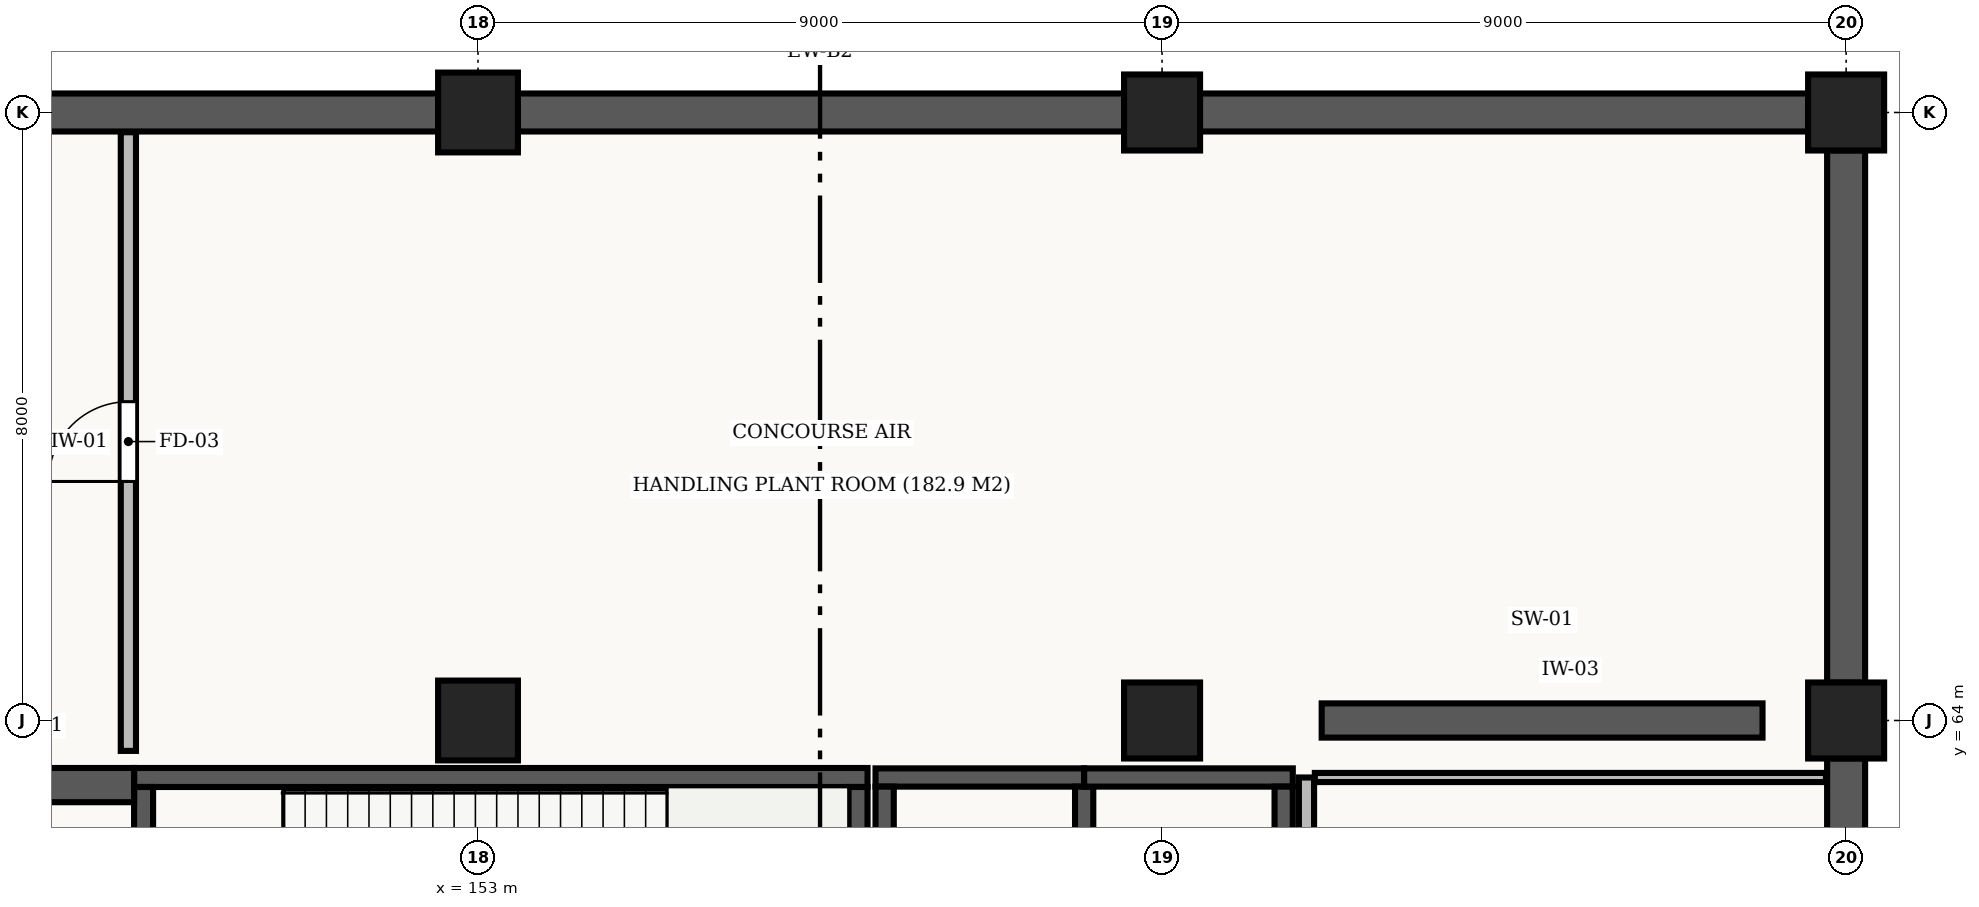
"""IFC4 building model, lengths in metres.
Left out: names, types, materials, properties, quantities, classifications, styles, units other than length and angle.
Written with IfcOpenShell. Run it as: python <this file> out.ifc"""

import sys

from ifc_helpers import new_model, si_unit, direction, frame, frame_2d, origin, origin_2d, place, context, subcontext, project, spatial, rectangle, extrude, element, fill, save


model = new_model("IFC4")
c1 = context("Model", 3, precision=1e-05, world=origin(), true_north=direction((0.0, 1.0)))
c2 = subcontext(c1, "Body", "Model", "MODEL_VIEW")
j1 = project(units=[si_unit("LENGTHUNIT", "METRE"), si_unit("PLANEANGLEUNIT", "RADIAN")], contexts=[c1])
p1 = place(None, origin())
s1 = spatial("IfcSite", under=j1, at=p1, CompositionType="ELEMENT")
p2 = place(p1, origin())
s2 = spatial("IfcBuilding", under=s1, at=p2, CompositionType="ELEMENT")
p3 = place(p2, frame((0.0, 0.0, -6.0)))
s3 = spatial("IfcBuildingStorey", under=s2, at=p3, CompositionType="ELEMENT", Elevation=-6.0)
for number, where, z_axis, x_axis in (
    (1, (153.0, 64.0, 0.0), (0.0, 0.0, 1.0), (1.0, 0.0, 0.0)),
    (2, (153.0, 72.0, 0.0), (0.0, 0.0, 1.0), (1.0, 0.0, 0.0)),
):
    element("IfcColumn", number, at=place(p3, frame(where, z_axis=z_axis, x_axis=x_axis)), inside=s3, PredefinedType="COLUMN", context=c2, shape_type="SweptSolid", body=[
        extrude(rectangle(XDim=1.05, YDim=1.05, at=origin_2d()), origin(), (0.0, 0.0, 1.0), 6.0),
    ])
for number, where, z_axis, x_axis in (
    (3, (162.0, 64.0, 0.0), (0.0, 0.0, 1.0), (1.0, 0.0, 0.0)),
    (4, (162.0, 72.0, 0.0), (0.0, 0.0, 1.0), (1.0, 0.0, 0.0)),
    (5, (171.0, 64.0, 0.0), (0.0, 0.0, 1.0), (1.0, 0.0, 0.0)),
    (6, (171.0, 72.0, 0.0), (0.0, 0.0, 1.0), (1.0, 0.0, 0.0)),
):
    element("IfcColumn", number, at=place(p3, frame(where, z_axis=z_axis, x_axis=x_axis)), inside=s3, PredefinedType="COLUMN", context=c2, shape_type="SweptSolid", body=[
        extrude(rectangle(XDim=1.0, YDim=1.0, at=origin_2d()), origin(), (0.0, 0.0, 1.0), 6.0),
    ])
for number, where, z_axis, x_axis in (
    (7, (144.498, 72.0, 0.0), (0.0, 0.0, 1.0), (1.0, 0.0, 0.0)),
    (8, (153.523, 72.0, 0.0), (0.0, 0.0, 1.0), (1.0, 0.0, 0.0)),
):
    element("IfcWall", number, at=place(p3, frame(where, z_axis=z_axis, x_axis=x_axis)), inside=s3, PredefinedType="STANDARD", context=c2, shape_type="SweptSolid", body=[
        extrude(rectangle(XDim=7.979, YDim=0.5, at=frame_2d((3.99, 0.0))), origin(), (0.0, 0.0, 1.0), 5.56),
    ])
p4 = place(p3, frame((162.498, 72.0, 0.0), z_axis=(0.0, 0.0, 1.0), x_axis=(1.0, 0.0, 0.0)))
e9 = element("IfcWall", 9, at=p4, inside=s3, PredefinedType="STANDARD", context=c2, shape_type="SweptSolid", body=[
    extrude(rectangle(XDim=8.004, YDim=0.5, at=frame_2d((4.002, 0.0))), origin(), (0.0, 0.0, 1.0), 5.56),
])
for number, where, z_axis, x_axis in (
    (10, (171.0, 71.502, 0.0), (0.0, 0.0, 1.0), (0.0, -1.0, 0.0)),
    (11, (171.0, 63.502, 0.0), (0.0, 0.0, 1.0), (0.0, -1.0, 0.0)),
):
    element("IfcWall", number, at=place(p3, frame(where, z_axis=z_axis, x_axis=x_axis)), inside=s3, PredefinedType="STANDARD", context=c2, shape_type="SweptSolid", body=[
        extrude(rectangle(XDim=7.004, YDim=0.5, at=frame_2d((3.502, 0.0))), origin(), (0.0, 0.0, 1.0), 5.56),
    ])
p5 = place(p3, frame((158.125, 63.25, 0.0), z_axis=(0.0, 0.0, 1.0), x_axis=(-1.0, 0.0, 0.0)))
e12 = element("IfcWall", 12, at=p5, inside=s3, PredefinedType="SHEAR", context=c2, shape_type="SweptSolid", body=[
    extrude(rectangle(XDim=9.65, YDim=0.25, at=frame_2d((4.825, 0.0))), origin(), (0.0, 0.0, 1.0), 5.55),
])
for number, where, z_axis, x_axis in (
    (13, (148.6, 63.125, 0.0), (0.0, 0.0, 1.0), (0.0, -1.0, 0.0)),
    (14, (158.0, 59.275, 0.0), (0.0, 0.0, 1.0), (0.0, 1.0, 0.0)),
):
    element("IfcWall", number, at=place(p3, frame(where, z_axis=z_axis, x_axis=x_axis)), inside=s3, PredefinedType="SHEAR", context=c2, shape_type="SweptSolid", body=[
        extrude(rectangle(XDim=3.85, YDim=0.25, at=frame_2d((1.925, 0.0))), origin(), (0.0, 0.0, 1.0), 5.55),
    ])
p6 = place(p3, frame((160.975, 63.25, 0.0), z_axis=(0.0, 0.0, 1.0), x_axis=(-1.0, 0.0, 0.0)))
e15 = element("IfcWall", 15, at=p6, inside=s3, PredefinedType="SHEAR", context=c2, shape_type="SweptSolid", body=[
    extrude(rectangle(XDim=2.745, YDim=0.24, at=frame_2d((1.373, 0.0))), origin(), (0.0, 0.0, 1.0), 5.55),
])
for number, where, z_axis, x_axis in (
    (16, (158.35, 63.13, 0.0), (0.0, 0.0, 1.0), (0.0, -1.0, 0.0)),
    (17, (160.975, 59.27, 0.0), (0.0, 0.0, 1.0), (0.0, 1.0, 0.0)),
):
    element("IfcWall", number, at=place(p3, frame(where, z_axis=z_axis, x_axis=x_axis)), inside=s3, PredefinedType="SHEAR", context=c2, shape_type="SweptSolid", body=[
        extrude(rectangle(XDim=3.86, YDim=0.24, at=frame_2d((1.93, 0.0))), origin(), (0.0, 0.0, 1.0), 5.55),
    ])
p7 = place(p3, frame((163.72, 63.25, 0.0), z_axis=(0.0, 0.0, 1.0), x_axis=(-1.0, 0.0, 0.0)))
e18 = element("IfcWall", 18, at=p7, inside=s3, PredefinedType="SHEAR", context=c2, shape_type="SweptSolid", body=[
    extrude(rectangle(XDim=2.745, YDim=0.24, at=frame_2d((1.373, 0.0))), origin(), (0.0, 0.0, 1.0), 5.55),
])
p8 = place(p3, frame((163.6, 59.27, 0.0), z_axis=(0.0, 0.0, 1.0), x_axis=(0.0, 1.0, 0.0)))
e19 = element("IfcWall", 19, at=p8, inside=s3, PredefinedType="SHEAR", context=c2, shape_type="SweptSolid", body=[
    extrude(rectangle(XDim=3.86, YDim=0.24, at=frame_2d((1.93, 0.0))), origin(), (0.0, 0.0, 1.0), 5.55),
])
p9 = place(p3, frame((145.775, 63.15, 0.0), z_axis=(0.0, 0.0, 1.0), x_axis=(1.0, 0.0, 0.0)))
e20 = element("IfcWall", 20, at=p9, inside=s3, PredefinedType="SHEAR", context=c2, shape_type="SweptSolid", body=[
    extrude(rectangle(XDim=2.7, YDim=0.45, at=frame_2d((1.35, 0.0))), origin(), (0.0, 0.0, 1.0), 4.6),
])
p10 = place(p3, frame((164.1, 64.0, 0.0), z_axis=(0.0, 0.0, 1.0), x_axis=(1.0, 0.0, 0.0)))
e21 = element("IfcWall", 21, at=p10, inside=s3, PredefinedType="SHEAR", context=c2, shape_type="SweptSolid", body=[
    extrude(rectangle(XDim=5.8, YDim=0.45, at=frame_2d((2.9, 0.0))), origin(), (0.0, 0.0, 1.0), 4.6),
])
p11 = place(p3, frame((163.9, 52.95, 0.0), z_axis=(0.0, 0.0, 1.0), x_axis=(0.0, 1.0, 0.0)))
e22 = element("IfcWall", 22, at=p11, inside=s3, PredefinedType="STANDARD", context=c2, shape_type="SweptSolid", body=[
    extrude(rectangle(XDim=10.3, YDim=0.2, at=frame_2d((5.15, 0.0))), origin(), (0.0, 0.0, 1.0), 5.55),
])
p12 = place(p11, frame((0.55, 0.0, 0.0)))
e23 = element("IfcOpeningElement", 23, at=p12, cuts=e22, PredefinedType="OPENING", context=c2, shape_type="SweptSolid", body=[
    extrude(rectangle(XDim=1.0, YDim=2.1, at=frame_2d((0.5, 1.05))), frame((0.0, 0.112, 0.0), z_axis=(0.0, -1.0, 0.0), x_axis=(1.0, 0.0, 0.0)), (0.0, 0.0, 1.0), 0.224),
])
p13 = place(p11, frame((2.7, 0.0, 0.0)))
e24 = element("IfcOpeningElement", 24, at=p13, cuts=e22, PredefinedType="OPENING", context=c2, shape_type="SweptSolid", body=[
    extrude(rectangle(XDim=0.95, YDim=2.1, at=frame_2d((0.475, 1.05))), frame((0.0, 0.112, 0.0), z_axis=(0.0, -1.0, 0.0), x_axis=(1.0, 0.0, 0.0)), (0.0, 0.0, 1.0), 0.224),
])
p14 = place(p11, frame((4.6, 0.0, 0.0)))
e25 = element("IfcOpeningElement", 25, at=p14, cuts=e22, PredefinedType="OPENING", context=c2, shape_type="SweptSolid", body=[
    extrude(rectangle(XDim=0.95, YDim=2.1, at=frame_2d((0.475, 1.05))), frame((0.0, 0.112, 0.0), z_axis=(0.0, -1.0, 0.0), x_axis=(1.0, 0.0, 0.0)), (0.0, 0.0, 1.0), 0.224),
])
p15 = place(p3, frame((164.01, 63.25, 0.0), z_axis=(0.0, 0.0, 1.0), x_axis=(1.0, 0.0, 0.0)))
e26 = element("IfcWall", 26, at=p15, inside=s3, PredefinedType="STANDARD", context=c2, shape_type="SweptSolid", body=[
    extrude(rectangle(XDim=6.725, YDim=0.12, at=frame_2d((3.363, 0.0))), origin(), (0.0, 0.0, 1.0), 5.55),
])
p16 = place(p3, frame((148.4, 63.6, 0.0), z_axis=(0.0, 0.0, 1.0), x_axis=(0.0, 1.0, 0.0)))
e27 = element("IfcWall", 27, at=p16, inside=s3, PredefinedType="STANDARD", context=c2, shape_type="SweptSolid", body=[
    extrude(rectangle(XDim=8.14, YDim=0.2, at=frame_2d((4.07, 0.0))), origin(), (0.0, 0.0, 1.0), 5.55),
])
p17 = place(p16, frame((3.545, 0.0, 0.0)))
e28 = element("IfcOpeningElement", 28, at=p17, cuts=e27, PredefinedType="OPENING", context=c2, shape_type="SweptSolid", body=[
    extrude(rectangle(XDim=1.05, YDim=2.15, at=frame_2d((0.525, 1.075))), frame((0.0, 0.112, 0.0), z_axis=(0.0, -1.0, 0.0), x_axis=(1.0, 0.0, 0.0)), (0.0, 0.0, 1.0), 0.224),
])
p18 = place(p17, origin())
e29 = element("IfcDoor", 29, at=p18, inside=s3, OperationType="SINGLE_SWING_LEFT", PredefinedType="DOOR", context=c2, shape_type="SweptSolid", body=[
    extrude(rectangle(XDim=1.05, YDim=2.15, at=frame_2d((0.525, 1.075))), frame((0.0, 0.025, 0.0), z_axis=(0.0, -1.0, 0.0), x_axis=(1.0, 0.0, 0.0)), (0.0, 0.0, 1.0), 0.05),
])
fill(e28, e29)
save(model, sys.argv[1])
